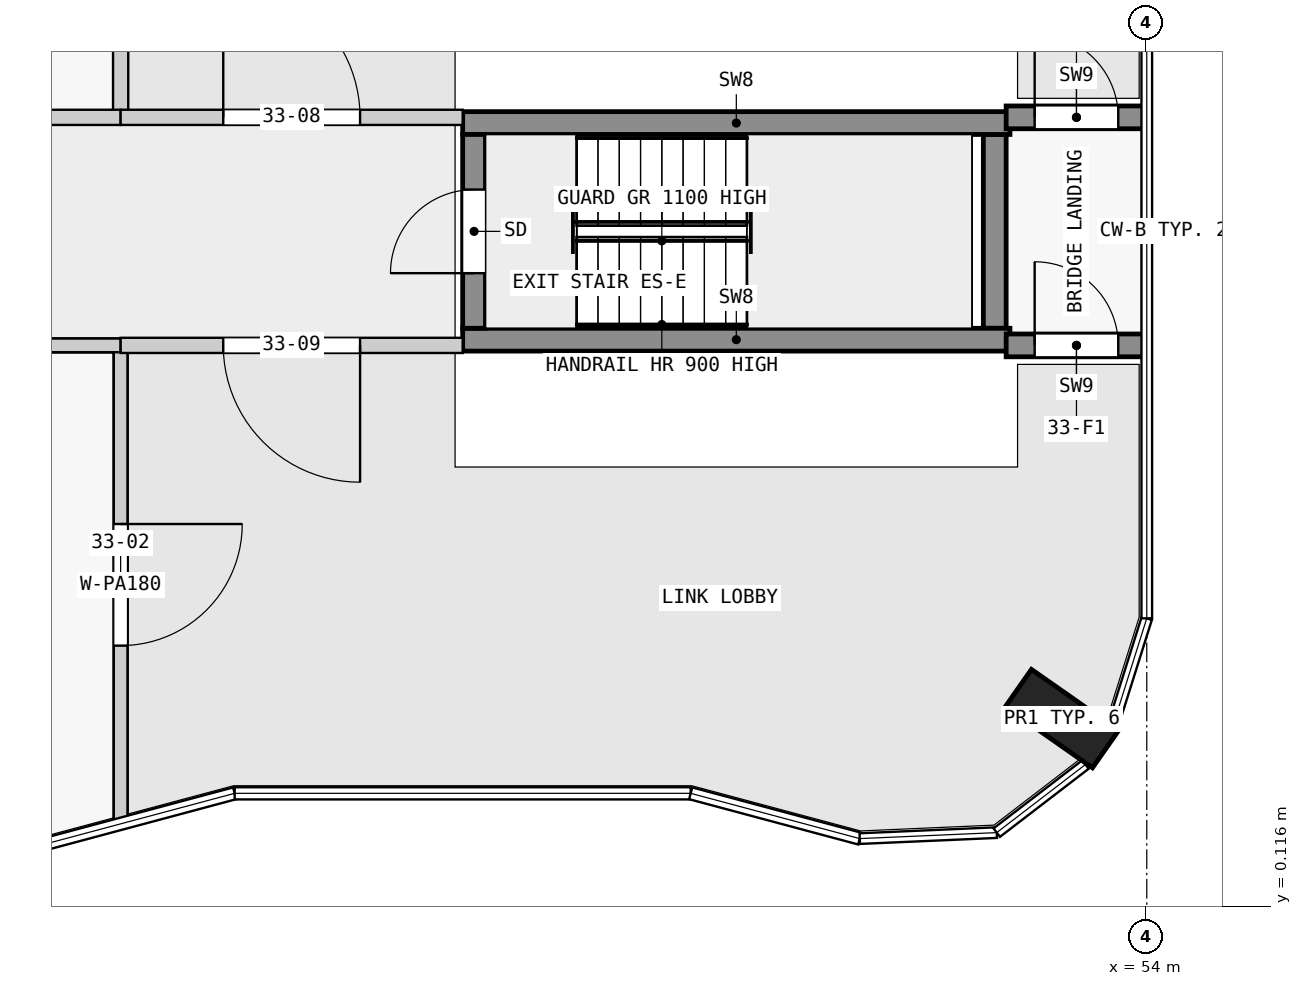
"""IFC4 building model, lengths in metres.
Left out: names, types, materials, properties, quantities, classifications, styles, units other than length and angle.
Written with IfcOpenShell. Run it as: python <this file> out.ifc"""

import sys

from ifc_helpers import new_model, si_unit, direction, frame, frame_2d, origin, origin_2d, place, context, subcontext, project, spatial, rectangle, extrude, element, fill, save


model = new_model("IFC4")
c1 = context("Model", 3, precision=1e-05, world=origin(), true_north=direction((0.0, 1.0)))
c2 = subcontext(c1, "Body", "Model", "MODEL_VIEW")
j1 = project(units=[si_unit("LENGTHUNIT", "METRE"), si_unit("PLANEANGLEUNIT", "RADIAN")], contexts=[c1])
p1 = place(None, origin())
s1 = spatial("IfcSite", under=j1, at=p1, CompositionType="ELEMENT")
p2 = place(p1, origin())
s2 = spatial("IfcBuilding", under=s1, at=p2, CompositionType="ELEMENT")
p3 = place(p2, frame((0.0, 0.0, 128.6)))
s3 = spatial("IfcBuildingStorey", under=s2, at=p3, CompositionType="ELEMENT", Elevation=128.6)
p4 = place(p3, frame((52.884, 2.59, 0.0), z_axis=(0.0, 0.0, 1.0), x_axis=(0.573542637991, 0.819175709117, 0.0)))
e1 = element("IfcColumn", 1, at=p4, inside=s3, PredefinedType="COLUMN", context=c2, shape_type="SweptSolid", body=[
    extrude(rectangle(XDim=0.6, YDim=1.4, at=origin_2d()), origin(), (0.0, 0.0, 1.0), 6.0),
])
p5 = place(p3, frame((45.15, 7.725, 0.0), z_axis=(0.0, 0.0, 1.0), x_axis=(0.0, 1.0, 0.0)))
e2 = element("IfcWall", 2, at=p5, inside=s3, PredefinedType="SHEAR", context=c2, shape_type="SweptSolid", body=[
    extrude(rectangle(XDim=2.55, YDim=0.3, at=frame_2d((1.275, 0.0))), origin(), (0.0, 0.0, 1.0), 6.0),
])
p6 = place(p5, frame((0.725, 0.0, 0.0)))
e3 = element("IfcOpeningElement", 3, at=p6, cuts=e2, PredefinedType="OPENING", context=c2, shape_type="SweptSolid", body=[
    extrude(rectangle(XDim=1.1, YDim=2.1, at=frame_2d((0.55, 1.05))), frame((0.0, 0.16, 0.0), z_axis=(0.0, -1.0, 0.0), x_axis=(1.0, 0.0, 0.0)), (0.0, 0.0, 1.0), 0.32),
])
p7 = place(p3, frame((52.0, 7.725, 0.0), z_axis=(0.0, 0.0, 1.0), x_axis=(0.0, 1.0, 0.0)))
e4 = element("IfcWall", 4, at=p7, inside=s3, PredefinedType="SHEAR", context=c2, shape_type="SweptSolid", body=[
    extrude(rectangle(XDim=2.55, YDim=0.3, at=frame_2d((1.275, 0.0))), origin(), (0.0, 0.0, 1.0), 6.0),
])
for number, where, z_axis, x_axis in (
    (5, (45.0, 7.575, 0.0), (0.0, 0.0, 1.0), (1.0, 0.0, 0.0)),
    (6, (45.0, 10.425, 0.0), (0.0, 0.0, 1.0), (1.0, 0.0, 0.0)),
):
    element("IfcWall", number, at=place(p3, frame(where, z_axis=z_axis, x_axis=x_axis)), inside=s3, PredefinedType="SHEAR", context=c2, shape_type="SweptSolid", body=[
        extrude(rectangle(XDim=7.2, YDim=0.3, at=frame_2d((3.6, 0.0))), origin(), (0.0, 0.0, 1.0), 6.0),
    ])
p8 = place(p3, frame((52.15, 7.5, 0.0), z_axis=(0.0, 0.0, 1.0), x_axis=(1.0, 0.0, 0.0)))
e7 = element("IfcWall", 7, at=p8, inside=s3, PredefinedType="SHEAR", context=c2, shape_type="SweptSolid", body=[
    extrude(rectangle(XDim=1.85, YDim=0.3, at=frame_2d((0.925, 0.0))), origin(), (0.0, 0.0, 1.0), 5.7),
])
p9 = place(p8, frame((0.375, 0.0, 0.0)))
e8 = element("IfcOpeningElement", 8, at=p9, cuts=e7, PredefinedType="OPENING", context=c2, shape_type="SweptSolid", body=[
    extrude(rectangle(XDim=1.1, YDim=2.1, at=frame_2d((0.55, 1.05))), frame((0.0, 0.16, 0.0), z_axis=(0.0, -1.0, 0.0), x_axis=(1.0, 0.0, 0.0)), (0.0, 0.0, 1.0), 0.32),
])
p10 = place(p3, frame((52.15, 10.5, 0.0), z_axis=(0.0, 0.0, 1.0), x_axis=(1.0, 0.0, 0.0)))
e9 = element("IfcWall", 9, at=p10, inside=s3, PredefinedType="SHEAR", context=c2, shape_type="SweptSolid", body=[
    extrude(rectangle(XDim=1.85, YDim=0.3, at=frame_2d((0.925, 0.0))), origin(), (0.0, 0.0, 1.0), 5.7),
])
p11 = place(p10, frame((0.375, 0.0, 0.0)))
e10 = element("IfcOpeningElement", 10, at=p11, cuts=e9, PredefinedType="OPENING", context=c2, shape_type="SweptSolid", body=[
    extrude(rectangle(XDim=1.1, YDim=2.1, at=frame_2d((0.55, 1.05))), frame((0.0, 0.16, 0.0), z_axis=(0.0, -1.0, 0.0), x_axis=(1.0, 0.0, 0.0)), (0.0, 0.0, 1.0), 0.32),
])
p12 = place(p3, frame((40.5, 16.795, 0.0), z_axis=(0.0, 0.0, 1.0), x_axis=(0.0, -1.0, 0.0)))
e11 = element("IfcWall", 11, at=p12, inside=s3, PredefinedType="PARTITIONING", context=c2, shape_type="SweptSolid", body=[
    extrude(rectangle(XDim=6.295, YDim=0.2, at=frame_2d((3.147, 0.0))), origin(), (0.0, 0.0, 1.0), 5.7),
])
p13 = place(p12, frame((2.6, 0.0, 0.0)))
e12 = element("IfcOpeningElement", 12, at=p13, cuts=e11, PredefinedType="OPENING", context=c2, shape_type="SweptSolid", body=[
    extrude(rectangle(XDim=0.9, YDim=2.1, at=frame_2d((0.45, 1.05))), frame((0.0, 0.11, 0.0), z_axis=(0.0, -1.0, 0.0), x_axis=(1.0, 0.0, 0.0)), (0.0, 0.0, 1.0), 0.22),
])
p14 = place(p3, frame((40.5, 7.5, 0.0), z_axis=(0.0, 0.0, 1.0), x_axis=(0.0, -1.0, 0.0)))
e13 = element("IfcWall", 13, at=p14, inside=s3, PredefinedType="PARTITIONING", context=c2, shape_type="SweptSolid", body=[
    extrude(rectangle(XDim=6.295, YDim=0.18, at=frame_2d((3.147, 0.0))), origin(), (0.0, 0.0, 1.0), 5.7),
])
p15 = place(p14, frame((2.35, 0.0, 0.0)))
e14 = element("IfcOpeningElement", 14, at=p15, cuts=e13, PredefinedType="OPENING", context=c2, shape_type="SweptSolid", body=[
    extrude(rectangle(XDim=1.6, YDim=2.4, at=frame_2d((0.8, 1.2))), frame((0.0, 0.1, 0.0), z_axis=(0.0, -1.0, 0.0), x_axis=(1.0, 0.0, 0.0)), (0.0, 0.0, 1.0), 0.2),
])
p16 = place(p3, frame((36.0, 10.5, 0.0), z_axis=(0.0, 0.0, 1.0), x_axis=(1.0, 0.0, 0.0)))
e15 = element("IfcWall", 15, at=p16, inside=s3, PredefinedType="PARTITIONING", context=c2, shape_type="SweptSolid", body=[
    extrude(rectangle(XDim=4.5, YDim=0.2, at=frame_2d((2.25, 0.0))), origin(), (0.0, 0.0, 1.0), 5.7),
])
p17 = place(p3, frame((40.5, 7.5, 0.0), z_axis=(0.0, 0.0, 1.0), x_axis=(-1.0, 0.0, 0.0)))
e16 = element("IfcWall", 16, at=p17, inside=s3, PredefinedType="PARTITIONING", context=c2, shape_type="SweptSolid", body=[
    extrude(rectangle(XDim=4.5, YDim=0.18, at=frame_2d((2.25, 0.0))), origin(), (0.0, 0.0, 1.0), 5.7),
])
p18 = place(p3, frame((40.5, 10.5, 0.0), z_axis=(0.0, 0.0, 1.0), x_axis=(1.0, 0.0, 0.0)))
e17 = element("IfcWall", 17, at=p18, inside=s3, PredefinedType="PARTITIONING", context=c2, shape_type="SweptSolid", body=[
    extrude(rectangle(XDim=4.5, YDim=0.2, at=frame_2d((2.25, 0.0))), origin(), (0.0, 0.0, 1.0), 5.7),
])
p19 = place(p18, frame((1.35, 0.0, 0.0)))
e18 = element("IfcOpeningElement", 18, at=p19, cuts=e17, PredefinedType="OPENING", context=c2, shape_type="SweptSolid", body=[
    extrude(rectangle(XDim=1.8, YDim=2.1, at=frame_2d((0.9, 1.05))), frame((0.0, 0.11, 0.0), z_axis=(0.0, -1.0, 0.0), x_axis=(1.0, 0.0, 0.0)), (0.0, 0.0, 1.0), 0.22),
])
p20 = place(p3, frame((45.0, 7.5, 0.0), z_axis=(0.0, 0.0, 1.0), x_axis=(-1.0, 0.0, 0.0)))
e19 = element("IfcWall", 19, at=p20, inside=s3, PredefinedType="PARTITIONING", context=c2, shape_type="SweptSolid", body=[
    extrude(rectangle(XDim=4.5, YDim=0.2, at=frame_2d((2.25, 0.0))), origin(), (0.0, 0.0, 1.0), 5.7),
])
p21 = place(p20, frame((1.35, 0.0, 0.0)))
e20 = element("IfcOpeningElement", 20, at=p21, cuts=e19, PredefinedType="OPENING", context=c2, shape_type="SweptSolid", body=[
    extrude(rectangle(XDim=1.8, YDim=2.1, at=frame_2d((0.9, 1.05))), frame((0.0, 0.11, 0.0), z_axis=(0.0, -1.0, 0.0), x_axis=(1.0, 0.0, 0.0)), (0.0, 0.0, 1.0), 0.22),
])
p22 = place(p6, origin())
e21 = element("IfcDoor", 21, at=p22, inside=s3, OperationType="SINGLE_SWING_LEFT", PredefinedType="DOOR", context=c2, shape_type="SweptSolid", body=[
    extrude(rectangle(XDim=1.1, YDim=2.1, at=frame_2d((0.55, 1.05))), frame((0.0, 0.025, 0.0), z_axis=(0.0, -1.0, 0.0), x_axis=(1.0, 0.0, 0.0)), (0.0, 0.0, 1.0), 0.05),
])
fill(e3, e21)
p23 = place(p15, origin())
e22 = element("IfcDoor", 22, at=p23, inside=s3, OperationType="SINGLE_SWING_LEFT", PredefinedType="DOOR", context=c2, shape_type="SweptSolid", body=[
    extrude(rectangle(XDim=1.6, YDim=2.4, at=frame_2d((0.8, 1.2))), frame((0.0, 0.025, 0.0), z_axis=(0.0, -1.0, 0.0), x_axis=(1.0, 0.0, 0.0)), (0.0, 0.0, 1.0), 0.05),
])
fill(e14, e22)
p24 = place(p19, origin())
e23 = element("IfcDoor", 23, at=p24, inside=s3, OperationType="DOUBLE_DOOR_SINGLE_SWING", PredefinedType="DOOR", context=c2, shape_type="SweptSolid", body=[
    extrude(rectangle(XDim=1.8, YDim=2.1, at=frame_2d((0.9, 1.05))), frame((0.0, 0.025, 0.0), z_axis=(0.0, -1.0, 0.0), x_axis=(1.0, 0.0, 0.0)), (0.0, 0.0, 1.0), 0.05),
])
fill(e18, e23)
p25 = place(p21, origin())
e24 = element("IfcDoor", 24, at=p25, inside=s3, OperationType="DOUBLE_DOOR_SINGLE_SWING", PredefinedType="DOOR", context=c2, shape_type="SweptSolid", body=[
    extrude(rectangle(XDim=1.8, YDim=2.1, at=frame_2d((0.9, 1.05))), frame((0.0, 0.025, 0.0), z_axis=(0.0, -1.0, 0.0), x_axis=(1.0, 0.0, 0.0)), (0.0, 0.0, 1.0), 0.05),
])
fill(e20, e24)
p26 = place(p9, origin())
e25 = element("IfcDoor", 25, at=p26, inside=s3, OperationType="SINGLE_SWING_LEFT", PredefinedType="DOOR", context=c2, shape_type="SweptSolid", body=[
    extrude(rectangle(XDim=1.1, YDim=2.1, at=frame_2d((0.55, 1.05))), frame((0.0, 0.025, 0.0), z_axis=(0.0, -1.0, 0.0), x_axis=(1.0, 0.0, 0.0)), (0.0, 0.0, 1.0), 0.05),
])
fill(e8, e25)
p27 = place(p11, origin())
e26 = element("IfcDoor", 26, at=p27, inside=s3, OperationType="SINGLE_SWING_LEFT", PredefinedType="DOOR", context=c2, shape_type="SweptSolid", body=[
    extrude(rectangle(XDim=1.1, YDim=2.1, at=frame_2d((0.55, 1.05))), frame((0.0, 0.025, 0.0), z_axis=(0.0, -1.0, 0.0), x_axis=(1.0, 0.0, 0.0)), (0.0, 0.0, 1.0), 0.05),
])
fill(e10, e26)
save(model, sys.argv[1])
